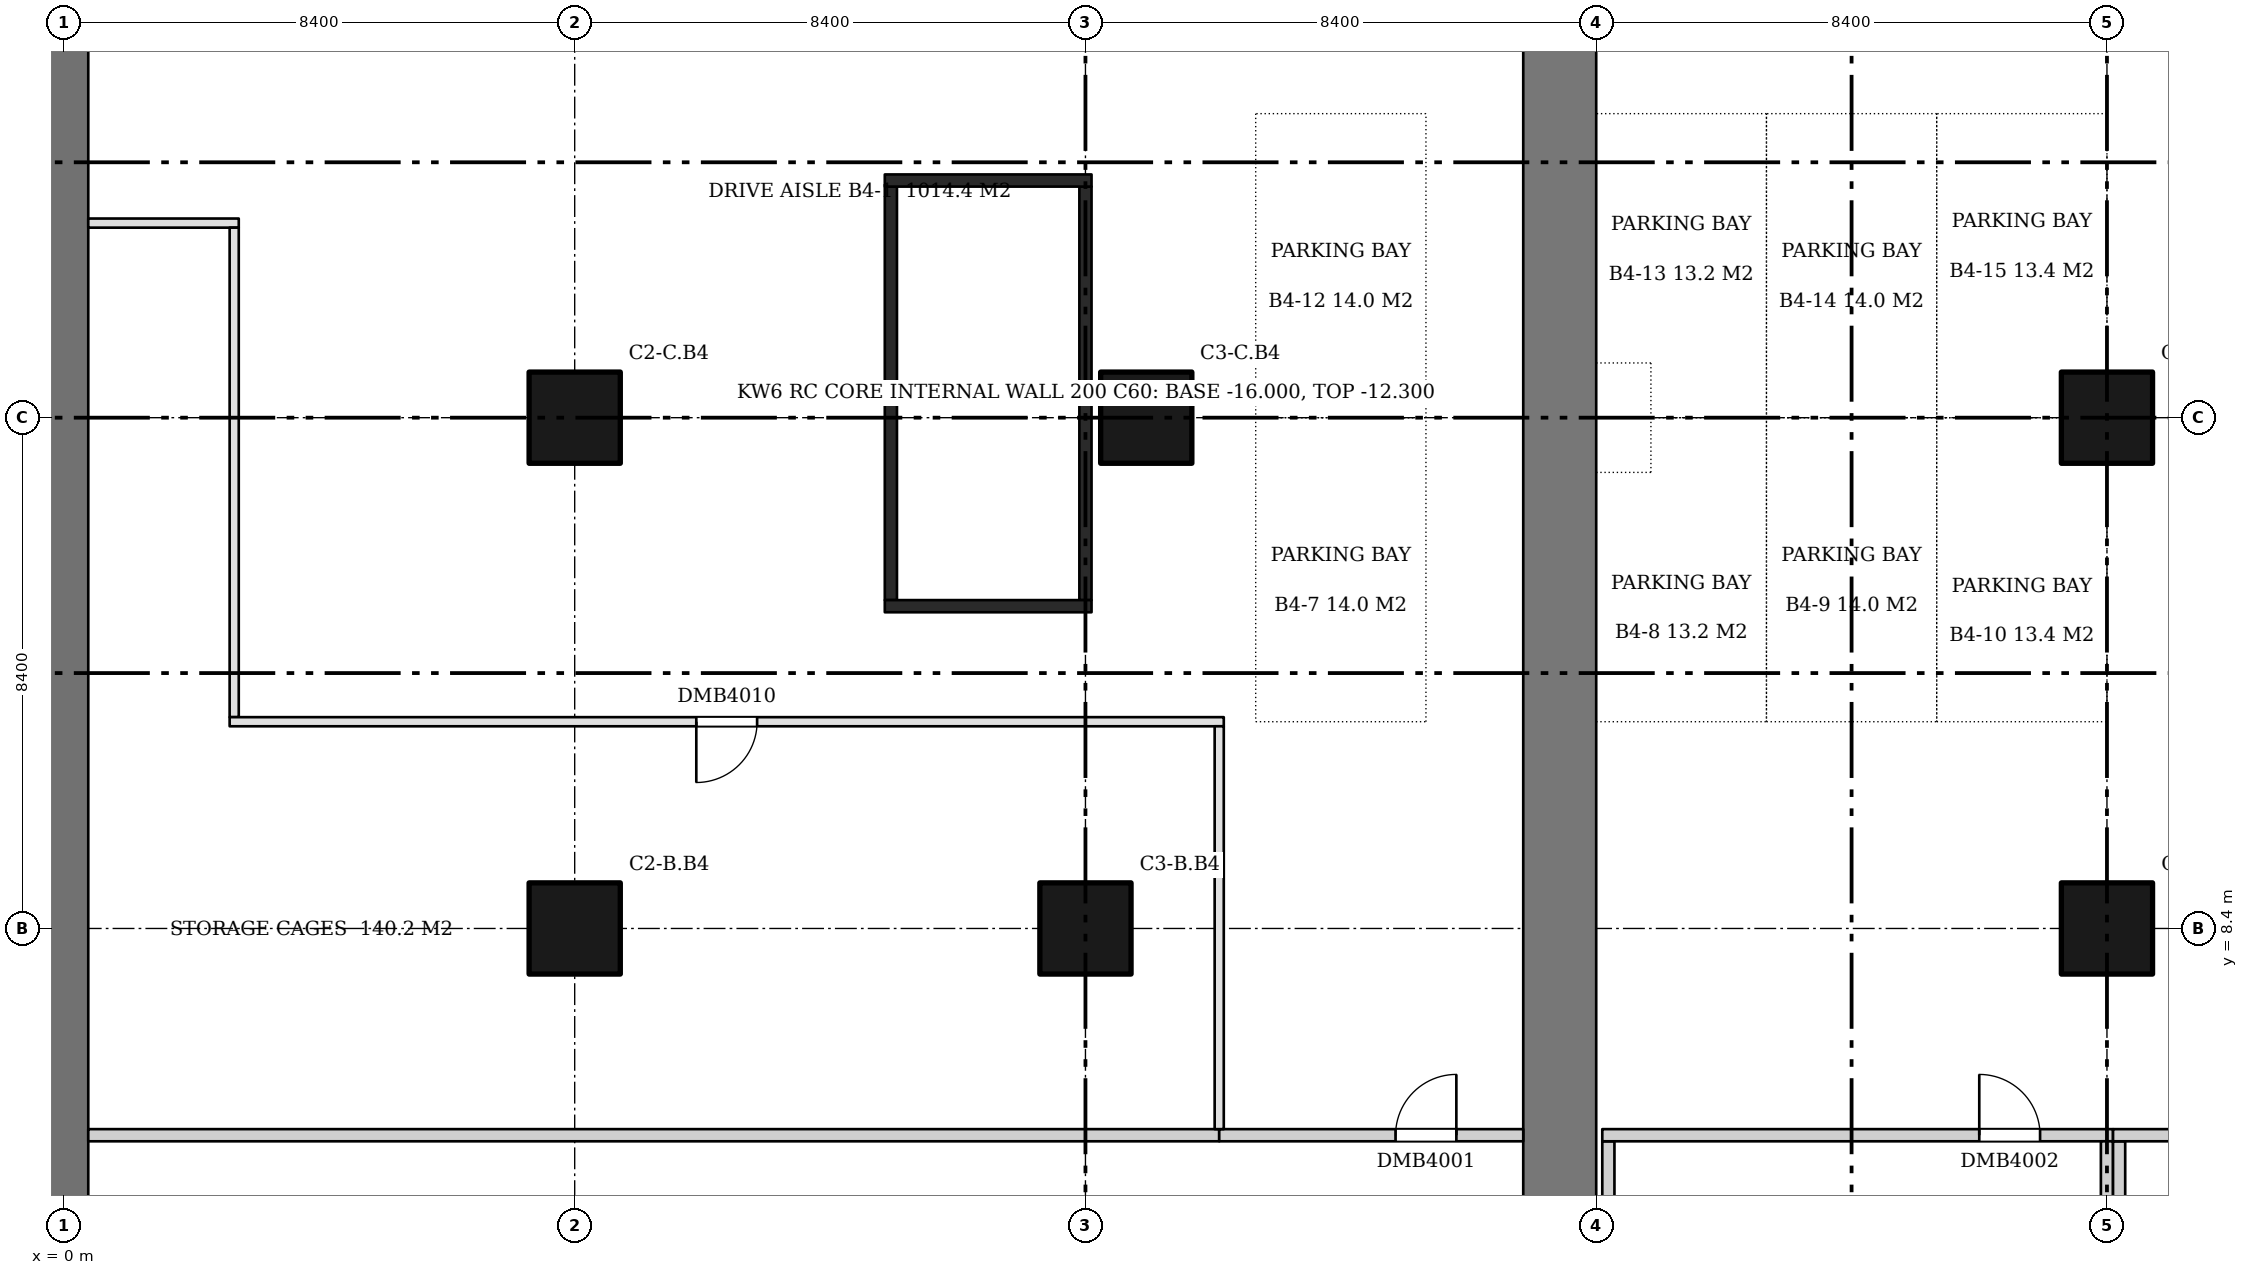
"""IFC4 building model, lengths in metres.
Left out: names, types, materials, properties, quantities, classifications, styles, units other than length and angle.
Written with IfcOpenShell. Run it as: python <this file> out.ifc"""

import sys

from ifc_helpers import new_model, si_unit, direction, frame, frame_2d, origin, origin_2d, place, context, subcontext, project, spatial, rectangle, extrude, element, fill, save


model = new_model("IFC4")
c1 = context("Model", 3, precision=1e-05, world=origin(), true_north=direction((0.0, 1.0)))
c2 = subcontext(c1, "Body", "Model", "MODEL_VIEW")
j1 = project(units=[si_unit("LENGTHUNIT", "METRE"), si_unit("PLANEANGLEUNIT", "RADIAN")], contexts=[c1])
p1 = place(None, origin())
s1 = spatial("IfcSite", under=j1, at=p1, CompositionType="ELEMENT")
p2 = place(p1, origin())
s2 = spatial("IfcBuilding", under=s1, at=p2, CompositionType="ELEMENT")
p3 = place(p2, frame((0.0, 0.0, -16.0)))
s3 = spatial("IfcBuildingStorey", under=s2, at=p3, CompositionType="ELEMENT", Elevation=-16.0)
p4 = place(p3, frame((0.0, 0.4, 0.0), z_axis=(0.0, 0.0, 1.0), x_axis=(0.0, 1.0, 0.0)))
e1 = element("IfcWall", 1, at=p4, inside=s3, PredefinedType="SOLIDWALL", context=c2, shape_type="SweptSolid", body=[
    extrude(rectangle(XDim=58.0, YDim=0.8, at=frame_2d((29.0, 0.0))), origin(), (0.0, 0.0, 1.0), 3.7),
])
p5 = place(p3, frame((24.6, 0.0, 0.0), z_axis=(0.0, 0.0, 1.0), x_axis=(0.0, 1.0, 0.0)))
e2 = element("IfcWall", 2, at=p5, inside=s3, PredefinedType="SHEAR", context=c2, shape_type="SweptSolid", body=[
    extrude(rectangle(XDim=25.2, YDim=1.2, at=frame_2d((12.6, 0.0))), origin(), (0.0, 0.0, 1.0), 3.7),
])
for number, where, z_axis, x_axis in (
    (3, (8.4, 8.4, 0.0), (0.0, 0.0, 1.0), (1.0, 0.0, 0.0)),
    (4, (8.4, 16.8, 0.0), (0.0, 0.0, 1.0), (1.0, 0.0, 0.0)),
    (5, (16.8, 8.4, 0.0), (0.0, 0.0, 1.0), (1.0, 0.0, 0.0)),
    (6, (17.8, 16.8, 0.0), (0.0, 0.0, 1.0), (1.0, 0.0, 0.0)),
    (7, (33.6, 8.4, 0.0), (0.0, 0.0, 1.0), (1.0, 0.0, 0.0)),
    (8, (33.6, 16.8, 0.0), (0.0, 0.0, 1.0), (1.0, 0.0, 0.0)),
):
    element("IfcColumn", number, at=place(p3, frame(where, z_axis=z_axis, x_axis=x_axis)), inside=s3, PredefinedType="COLUMN", context=c2, shape_type="SweptSolid", body=[
        extrude(rectangle(XDim=1.5, YDim=1.5, at=origin_2d()), origin(), (0.0, 0.0, 1.0), 3.7),
    ])
for number, where, z_axis, x_axis in (
    (9, (13.6, 13.8, 0.0), (0.0, 0.0, 1.0), (0.0, 1.0, 0.0)),
    (10, (16.8, 13.8, 0.0), (0.0, 0.0, 1.0), (0.0, 1.0, 0.0)),
):
    element("IfcWall", number, at=place(p3, frame(where, z_axis=z_axis, x_axis=x_axis)), inside=s3, PredefinedType="SHEAR", context=c2, shape_type="SweptSolid", body=[
        extrude(rectangle(XDim=6.8, YDim=0.2, at=frame_2d((3.4, 0.0))), origin(), (0.0, 0.0, 1.0), 3.7),
    ])
for number, where, z_axis, x_axis in (
    (11, (13.5, 13.7, 0.0), (0.0, 0.0, 1.0), (1.0, 0.0, 0.0)),
    (12, (13.5, 20.7, 0.0), (0.0, 0.0, 1.0), (1.0, 0.0, 0.0)),
):
    element("IfcWall", number, at=place(p3, frame(where, z_axis=z_axis, x_axis=x_axis)), inside=s3, PredefinedType="SHEAR", context=c2, shape_type="SweptSolid", body=[
        extrude(rectangle(XDim=3.4, YDim=0.2, at=frame_2d((1.7, 0.0))), origin(), (0.0, 0.0, 1.0), 3.7),
    ])
p6 = place(p3, frame((0.4, 5.0, 0.0), z_axis=(0.0, 0.0, 1.0), x_axis=(1.0, 0.0, 0.0)))
e13 = element("IfcWall", 13, at=p6, inside=s3, PredefinedType="PARTITIONING", context=c2, shape_type="SweptSolid", body=[
    extrude(rectangle(XDim=18.6, YDim=0.2, at=frame_2d((9.3, 0.0))), origin(), (0.0, 0.0, 1.0), 3.7),
])
p7 = place(p3, frame((0.4, 20.0, 0.0), z_axis=(0.0, 0.0, 1.0), x_axis=(1.0, 0.0, 0.0)))
e14 = element("IfcWall", 14, at=p7, inside=s3, PredefinedType="PARTITIONING", context=c2, shape_type="SweptSolid", body=[
    extrude(rectangle(XDim=2.475, YDim=0.15, at=frame_2d((1.238, 0.0))), origin(), (0.0, 0.0, 1.0), 3.7),
])
p8 = place(p3, frame((2.8, 11.875, 0.0), z_axis=(0.0, 0.0, 1.0), x_axis=(0.0, 1.0, 0.0)))
e15 = element("IfcWall", 15, at=p8, inside=s3, PredefinedType="PARTITIONING", context=c2, shape_type="SweptSolid", body=[
    extrude(rectangle(XDim=8.05, YDim=0.15, at=frame_2d((4.025, 0.0))), origin(), (0.0, 0.0, 1.0), 3.7),
])
p9 = place(p3, frame((2.725, 11.8, 0.0), z_axis=(0.0, 0.0, 1.0), x_axis=(1.0, 0.0, 0.0)))
e16 = element("IfcWall", 16, at=p9, inside=s3, PredefinedType="PARTITIONING", context=c2, shape_type="SweptSolid", body=[
    extrude(rectangle(XDim=16.35, YDim=0.15, at=frame_2d((8.175, 0.0))), origin(), (0.0, 0.0, 1.0), 3.7),
])
p10 = place(p9, frame((7.675, 0.0, 0.0)))
e17 = element("IfcOpeningElement", 17, at=p10, cuts=e16, PredefinedType="OPENING", context=c2, shape_type="SweptSolid", body=[
    extrude(rectangle(XDim=1.0, YDim=2.1, at=frame_2d((0.5, 1.05))), frame((0.0, 0.085, 0.0), z_axis=(0.0, -1.0, 0.0), x_axis=(1.0, 0.0, 0.0)), (0.0, 0.0, 1.0), 0.17),
])
p11 = place(p3, frame((19.0, 5.1, 0.0), z_axis=(0.0, 0.0, 1.0), x_axis=(0.0, 1.0, 0.0)))
e18 = element("IfcWall", 18, at=p11, inside=s3, PredefinedType="PARTITIONING", context=c2, shape_type="SweptSolid", body=[
    extrude(rectangle(XDim=6.625, YDim=0.15, at=frame_2d((3.312, 0.0))), origin(), (0.0, 0.0, 1.0), 3.7),
])
p12 = place(p3, frame((19.0, 5.0, 0.0), z_axis=(0.0, 0.0, 1.0), x_axis=(1.0, 0.0, 0.0)))
e19 = element("IfcWall", 19, at=p12, inside=s3, PredefinedType="PARTITIONING", context=c2, shape_type="SweptSolid", body=[
    extrude(rectangle(XDim=5.0, YDim=0.2, at=frame_2d((2.5, 0.0))), origin(), (0.0, 0.0, 1.0), 3.7),
])
p13 = place(p12, frame((2.9, 0.0, 0.0)))
e20 = element("IfcOpeningElement", 20, at=p13, cuts=e19, PredefinedType="OPENING", context=c2, shape_type="SweptSolid", body=[
    extrude(rectangle(XDim=1.0, YDim=2.1, at=frame_2d((0.5, 1.05))), frame((0.0, 0.11, 0.0), z_axis=(0.0, -1.0, 0.0), x_axis=(1.0, 0.0, 0.0)), (0.0, 0.0, 1.0), 0.22),
])
p14 = place(p3, frame((25.4, 0.4, 0.0), z_axis=(0.0, 0.0, 1.0), x_axis=(0.0, 1.0, 0.0)))
e21 = element("IfcWall", 21, at=p14, inside=s3, PredefinedType="PARTITIONING", context=c2, shape_type="SweptSolid", body=[
    extrude(rectangle(XDim=4.5, YDim=0.2, at=frame_2d((2.25, 0.0))), origin(), (0.0, 0.0, 1.0), 3.7),
])
p15 = place(p3, frame((25.3, 5.0, 0.0), z_axis=(0.0, 0.0, 1.0), x_axis=(1.0, 0.0, 0.0)))
e22 = element("IfcWall", 22, at=p15, inside=s3, PredefinedType="PARTITIONING", context=c2, shape_type="SweptSolid", body=[
    extrude(rectangle(XDim=8.4, YDim=0.2, at=frame_2d((4.2, 0.0))), origin(), (0.0, 0.0, 1.0), 3.7),
])
p16 = place(p15, frame((6.2, 0.0, 0.0)))
e23 = element("IfcOpeningElement", 23, at=p16, cuts=e22, PredefinedType="OPENING", context=c2, shape_type="SweptSolid", body=[
    extrude(rectangle(XDim=1.0, YDim=2.1, at=frame_2d((0.5, 1.05))), frame((0.0, 0.11, 0.0), z_axis=(0.0, -1.0, 0.0), x_axis=(1.0, 0.0, 0.0)), (0.0, 0.0, 1.0), 0.22),
])
for number, where, z_axis, x_axis in (
    (24, (33.6, 0.4, 0.0), (0.0, 0.0, 1.0), (0.0, 1.0, 0.0)),
    (25, (33.8, 0.4, 0.0), (0.0, 0.0, 1.0), (0.0, 1.0, 0.0)),
):
    element("IfcWall", number, at=place(p3, frame(where, z_axis=z_axis, x_axis=x_axis)), inside=s3, PredefinedType="PARTITIONING", context=c2, shape_type="SweptSolid", body=[
        extrude(rectangle(XDim=4.5, YDim=0.2, at=frame_2d((2.25, 0.0))), origin(), (0.0, 0.0, 1.0), 3.7),
    ])
p17 = place(p3, frame((33.7, 5.0, 0.0), z_axis=(0.0, 0.0, 1.0), x_axis=(1.0, 0.0, 0.0)))
e26 = element("IfcWall", 26, at=p17, inside=s3, PredefinedType="PARTITIONING", context=c2, shape_type="SweptSolid", body=[
    extrude(rectangle(XDim=8.2, YDim=0.2, at=frame_2d((4.1, 0.0))), origin(), (0.0, 0.0, 1.0), 3.7),
])
p18 = place(p17, frame((6.0, 0.0, 0.0)))
e27 = element("IfcOpeningElement", 27, at=p18, cuts=e26, PredefinedType="OPENING", context=c2, shape_type="SweptSolid", body=[
    extrude(rectangle(XDim=1.0, YDim=2.1, at=frame_2d((0.5, 1.05))), frame((0.0, 0.11, 0.0), z_axis=(0.0, -1.0, 0.0), x_axis=(1.0, 0.0, 0.0)), (0.0, 0.0, 1.0), 0.22),
])
p19 = place(p13, origin())
e28 = element("IfcDoor", 28, at=p19, inside=s3, OperationType="SINGLE_SWING_RIGHT", PredefinedType="DOOR", context=c2, shape_type="SweptSolid", body=[
    extrude(rectangle(XDim=1.0, YDim=2.1, at=frame_2d((0.5, 1.05))), frame((0.0, 0.025, 0.0), z_axis=(0.0, -1.0, 0.0), x_axis=(1.0, 0.0, 0.0)), (0.0, 0.0, 1.0), 0.05),
])
fill(e20, e28)
p20 = place(p16, origin())
e29 = element("IfcDoor", 29, at=p20, inside=s3, OperationType="SINGLE_SWING_LEFT", PredefinedType="DOOR", context=c2, shape_type="SweptSolid", body=[
    extrude(rectangle(XDim=1.0, YDim=2.1, at=frame_2d((0.5, 1.05))), frame((0.0, 0.025, 0.0), z_axis=(0.0, -1.0, 0.0), x_axis=(1.0, 0.0, 0.0)), (0.0, 0.0, 1.0), 0.05),
])
fill(e23, e29)
p21 = place(p10, frame((1.0, 0.0, 0.0), z_axis=(0.0, 0.0, 1.0), x_axis=(-1.0, 0.0, 0.0)))
e30 = element("IfcDoor", 30, at=p21, inside=s3, OperationType="SINGLE_SWING_RIGHT", PredefinedType="DOOR", context=c2, shape_type="SweptSolid", body=[
    extrude(rectangle(XDim=1.0, YDim=2.1, at=frame_2d((0.5, 1.05))), frame((0.0, 0.025, 0.0), z_axis=(0.0, -1.0, 0.0), x_axis=(1.0, 0.0, 0.0)), (0.0, 0.0, 1.0), 0.05),
])
fill(e17, e30)
save(model, sys.argv[1])
